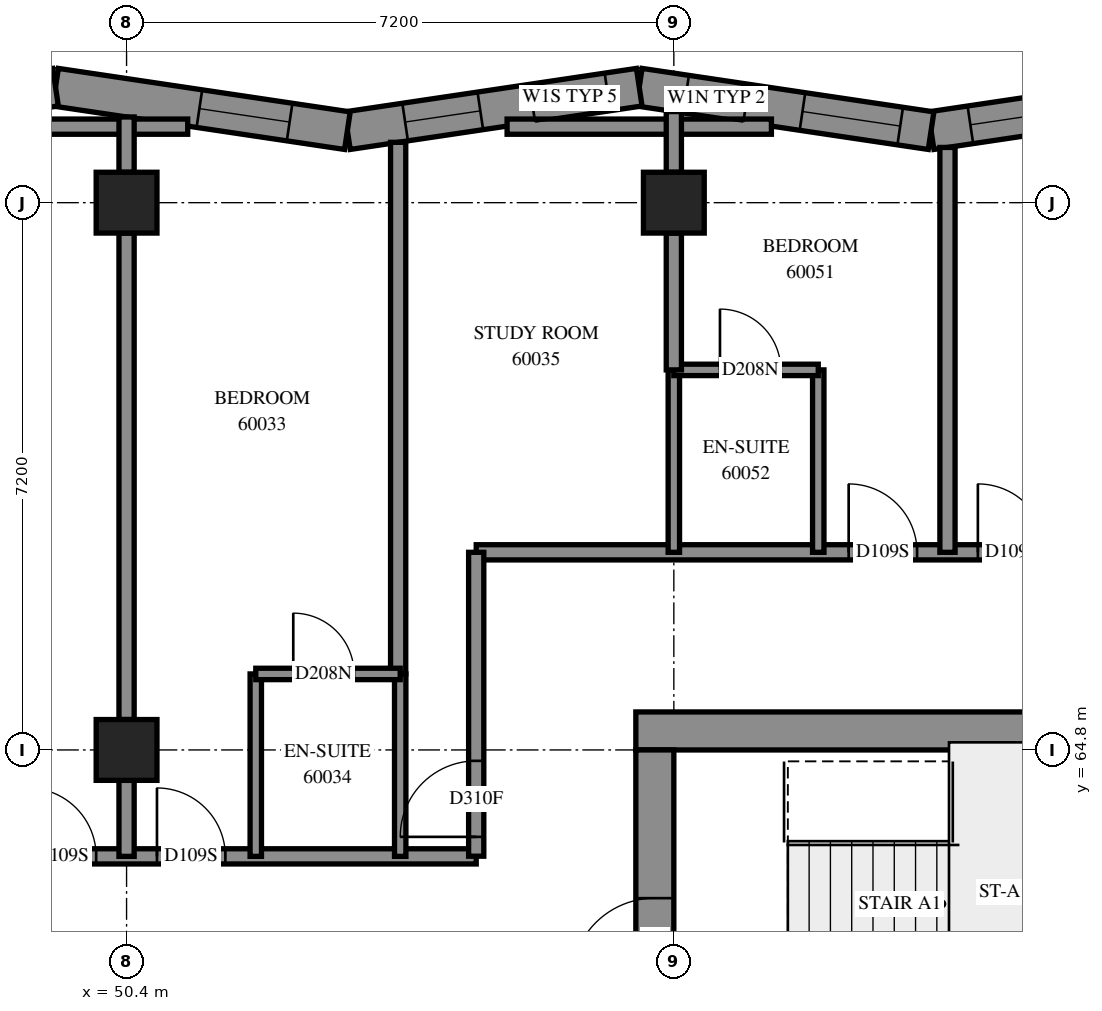
"""IFC4 building model, lengths in metres.
Left out: names, types, materials, properties, quantities, classifications, styles, units other than length and angle.
Written with IfcOpenShell. Run it as: python <this file> out.ifc"""

import sys

from ifc_helpers import new_model, si_unit, direction, frame, frame_2d, origin, origin_2d, place, context, subcontext, project, spatial, polyline, rectangle, outline, extrude, element, fill, save


model = new_model("IFC4")
c1 = context("Model", 3, precision=1e-05, world=origin(), true_north=direction((0.0, 1.0)))
c2 = subcontext(c1, "Body", "Model", "MODEL_VIEW")
j1 = project(units=[si_unit("LENGTHUNIT", "METRE"), si_unit("PLANEANGLEUNIT", "RADIAN")], contexts=[c1])
p1 = place(None, origin())
s1 = spatial("IfcSite", under=j1, at=p1, CompositionType="ELEMENT")
p2 = place(p1, origin())
s2 = spatial("IfcBuilding", under=s1, at=p2, CompositionType="ELEMENT")
p3 = place(p2, frame((0.0, 0.0, 220.2)))
s3 = spatial("IfcBuildingStorey", under=s2, at=p3, CompositionType="ELEMENT", Elevation=220.2)
for number, where, z_axis, x_axis in (
    (1, (50.4, 64.8, 0.0), (0.0, 0.0, 1.0), (1.0, 0.0, 0.0)),
    (2, (50.4, 72.0, 0.0), (0.0, 0.0, 1.0), (1.0, 0.0, 0.0)),
    (3, (57.6, 72.0, 0.0), (0.0, 0.0, 1.0), (1.0, 0.0, 0.0)),
):
    element("IfcColumn", number, at=place(p3, frame(where, z_axis=z_axis, x_axis=x_axis)), inside=s3, PredefinedType="COLUMN", context=c2, shape_type="SweptSolid", body=[
        extrude(rectangle(XDim=0.8, YDim=0.8, at=origin_2d()), origin(), (0.0, 0.0, 1.0), 3.1),
    ])
p4 = place(p3, frame((57.1, 65.05, -0.3), z_axis=(0.0, 0.0, 1.0), x_axis=(1.0, 0.0, 0.0)))
e4 = element("IfcWall", 4, at=p4, inside=s3, PredefinedType="SHEAR", context=c2, shape_type="SweptSolid", body=[
    extrude(rectangle(XDim=15.4, YDim=0.5, at=frame_2d((7.7, 0.0))), origin(), (0.0, 0.0, 1.0), 2.7),
])
p5 = place(p4, frame((10.5, 0.0, 0.3)))
e5 = element("IfcOpeningElement", 5, at=p5, cuts=e4, PredefinedType="OPENING", context=c2, shape_type="SweptSolid", body=[
    extrude(rectangle(XDim=0.8, YDim=2.1, at=frame_2d((0.4, 1.05))), frame((0.0, 0.26, 0.0), z_axis=(0.0, -1.0, 0.0), x_axis=(1.0, 0.0, 0.0)), (0.0, 0.0, 1.0), 0.52),
])
p6 = place(p3, frame((57.35, 50.4, -0.3), z_axis=(0.0, 0.0, 1.0), x_axis=(0.0, 1.0, 0.0)))
e6 = element("IfcWall", 6, at=p6, inside=s3, PredefinedType="SHEAR", context=c2, shape_type="SweptSolid", body=[
    extrude(rectangle(XDim=14.4, YDim=0.5, at=frame_2d((7.2, 0.0))), origin(), (0.0, 0.0, 1.0), 2.7),
])
p7 = place(p6, frame((4.55, 0.0, 0.3)))
e7 = element("IfcOpeningElement", 7, at=p7, cuts=e6, PredefinedType="OPENING", context=c2, shape_type="SweptSolid", body=[
    extrude(rectangle(XDim=1.1, YDim=2.1, at=frame_2d((0.55, 1.05))), frame((0.0, 0.26, 0.0), z_axis=(0.0, -1.0, 0.0), x_axis=(1.0, 0.0, 0.0)), (0.0, 0.0, 1.0), 0.52),
])
p8 = place(p6, frame((11.35, 0.0, 0.3)))
e8 = element("IfcOpeningElement", 8, at=p8, cuts=e6, PredefinedType="OPENING", context=c2, shape_type="SweptSolid", body=[
    extrude(rectangle(XDim=1.1, YDim=2.1, at=frame_2d((0.55, 1.05))), frame((0.0, 0.26, 0.0), z_axis=(0.0, -1.0, 0.0), x_axis=(1.0, 0.0, 0.0)), (0.0, 0.0, 1.0), 0.52),
])
p9 = place(p3, frame((64.824, 73.519, 0.0), z_axis=(0.0, 0.0, 1.0), x_axis=(-0.9890847468, -0.1473477641, 0.0)))
e9 = element("IfcWall", 9, at=p9, inside=s3, PredefinedType="SOLIDWALL", context=c2, shape_type="SweptSolid", body=[
    extrude(outline(polyline([(-0.037, -0.25), (3.845, -0.25), (3.919, 0.25), (0.037, 0.25), (-0.037, -0.25)])), origin(), (0.0, 0.0, 1.0), 3.1),
])
p10 = place(p9, frame((0.36, 0.0, 0.45)))
e10 = element("IfcOpeningElement", 10, at=p10, cuts=e9, PredefinedType="OPENING", context=c2, shape_type="SweptSolid", body=[
    extrude(rectangle(XDim=1.3, YDim=2.5, at=frame_2d((0.65, 1.25))), frame((0.0, 0.26, 0.0), z_axis=(0.0, -1.0, 0.0), x_axis=(1.0, 0.0, 0.0)), (0.0, 0.0, 1.0), 0.52),
])
p11 = place(p9, frame((2.06, 0.0, 0.45)))
e11 = element("IfcOpeningElement", 11, at=p11, cuts=e9, PredefinedType="OPENING", context=c2, shape_type="SweptSolid", body=[
    extrude(rectangle(XDim=1.3, YDim=2.5, at=frame_2d((0.65, 1.25))), frame((0.0, 0.26, 0.0), z_axis=(0.0, -1.0, 0.0), x_axis=(1.0, 0.0, 0.0)), (0.0, 0.0, 1.0), 0.52),
])
p12 = place(p3, frame((60.984, 72.947, 0.0), z_axis=(0.0, 0.0, 1.0), x_axis=(-0.9890847468, 0.1473477641, 0.0)))
e12 = element("IfcWall", 12, at=p12, inside=s3, PredefinedType="SOLIDWALL", context=c2, shape_type="SweptSolid", body=[
    extrude(outline(polyline([(0.037, -0.25), (3.919, -0.25), (3.845, 0.25), (-0.037, 0.25), (0.037, -0.25)])), origin(), (0.0, 0.0, 1.0), 3.1),
])
p13 = place(p12, frame((0.411, 0.0, 0.45)))
e13 = element("IfcOpeningElement", 13, at=p13, cuts=e12, PredefinedType="OPENING", context=c2, shape_type="SweptSolid", body=[
    extrude(rectangle(XDim=1.3, YDim=2.5, at=frame_2d((0.65, 1.25))), frame((0.0, 0.26, 0.0), z_axis=(0.0, -1.0, 0.0), x_axis=(1.0, 0.0, 0.0)), (0.0, 0.0, 1.0), 0.52),
])
p14 = place(p12, frame((2.459, 0.0, 0.45)))
e14 = element("IfcOpeningElement", 14, at=p14, cuts=e12, PredefinedType="OPENING", context=c2, shape_type="SweptSolid", body=[
    extrude(rectangle(XDim=0.8, YDim=2.5, at=frame_2d((0.4, 1.25))), frame((0.0, 0.26, 0.0), z_axis=(0.0, -1.0, 0.0), x_axis=(1.0, 0.0, 0.0)), (0.0, 0.0, 1.0), 0.52),
])
p15 = place(p3, frame((57.145, 73.519, 0.0), z_axis=(0.0, 0.0, 1.0), x_axis=(-0.9890847468, -0.1473477641, 0.0)))
e15 = element("IfcWall", 15, at=p15, inside=s3, PredefinedType="SOLIDWALL", context=c2, shape_type="SweptSolid", body=[
    extrude(outline(polyline([(-0.037, -0.25), (3.845, -0.25), (3.919, 0.25), (0.037, 0.25), (-0.037, -0.25)])), origin(), (0.0, 0.0, 1.0), 3.1),
])
p16 = place(p15, frame((0.423, 0.0, 0.45)))
e16 = element("IfcOpeningElement", 16, at=p16, cuts=e15, PredefinedType="OPENING", context=c2, shape_type="SweptSolid", body=[
    extrude(rectangle(XDim=1.0, YDim=2.5, at=frame_2d((0.5, 1.25))), frame((0.0, 0.26, 0.0), z_axis=(0.0, -1.0, 0.0), x_axis=(1.0, 0.0, 0.0)), (0.0, 0.0, 1.0), 0.52),
])
p17 = place(p15, frame((2.114, 0.0, 0.45)))
e17 = element("IfcOpeningElement", 17, at=p17, cuts=e15, PredefinedType="OPENING", context=c2, shape_type="SweptSolid", body=[
    extrude(rectangle(XDim=1.0, YDim=2.5, at=frame_2d((0.5, 1.25))), frame((0.0, 0.26, 0.0), z_axis=(0.0, -1.0, 0.0), x_axis=(1.0, 0.0, 0.0)), (0.0, 0.0, 1.0), 0.52),
])
p18 = place(p3, frame((53.305, 72.947, 0.0), z_axis=(0.0, 0.0, 1.0), x_axis=(-0.9890847468, 0.1473477641, 0.0)))
e18 = element("IfcWall", 18, at=p18, inside=s3, PredefinedType="SOLIDWALL", context=c2, shape_type="SweptSolid", body=[
    extrude(outline(polyline([(0.037, -0.25), (3.919, -0.25), (3.845, 0.25), (-0.037, 0.25), (0.037, -0.25)])), origin(), (0.0, 0.0, 1.0), 3.1),
])
p19 = place(p18, frame((0.769, 0.0, 0.45)))
e19 = element("IfcOpeningElement", 19, at=p19, cuts=e18, PredefinedType="OPENING", context=c2, shape_type="SweptSolid", body=[
    extrude(rectangle(XDim=1.2, YDim=2.5, at=frame_2d((0.6, 1.25))), frame((0.0, 0.26, 0.0), z_axis=(0.0, -1.0, 0.0), x_axis=(1.0, 0.0, 0.0)), (0.0, 0.0, 1.0), 0.52),
])
p20 = place(p3, frame((49.466, 73.519, 0.0), z_axis=(0.0, 0.0, 1.0), x_axis=(-0.9890847468, -0.1473477641, 0.0)))
e20 = element("IfcWall", 20, at=p20, inside=s3, PredefinedType="SOLIDWALL", context=c2, shape_type="SweptSolid", body=[
    extrude(outline(polyline([(-0.037, -0.25), (3.845, -0.25), (3.919, 0.25), (0.037, 0.25), (-0.037, -0.25)])), origin(), (0.0, 0.0, 1.0), 3.1),
])
p21 = place(p20, frame((0.466, 0.0, 0.45)))
e21 = element("IfcOpeningElement", 21, at=p21, cuts=e20, PredefinedType="OPENING", context=c2, shape_type="SweptSolid", body=[
    extrude(rectangle(XDim=1.2, YDim=2.5, at=frame_2d((0.6, 1.25))), frame((0.0, 0.26, 0.0), z_axis=(0.0, -1.0, 0.0), x_axis=(1.0, 0.0, 0.0)), (0.0, 0.0, 1.0), 0.52),
])
p22 = place(p3, frame((55.0, 67.4, 0.0), z_axis=(0.0, 0.0, 1.0), x_axis=(1.0, 0.0, 0.0)))
e22 = element("IfcWall", 22, at=p22, inside=s3, PredefinedType="PARTITIONING", context=c2, shape_type="SweptSolid", body=[
    extrude(rectangle(XDim=19.6, YDim=0.2, at=frame_2d((9.8, 0.0))), origin(), (0.0, 0.0, 1.0), 3.1),
])
p23 = place(p22, frame((4.9, 0.0, 0.0)))
e23 = element("IfcOpeningElement", 23, at=p23, cuts=e22, PredefinedType="OPENING", context=c2, shape_type="SweptSolid", body=[
    extrude(rectangle(XDim=0.9, YDim=2.1, at=frame_2d((0.45, 1.05))), frame((0.0, 0.11, 0.0), z_axis=(0.0, -1.0, 0.0), x_axis=(1.0, 0.0, 0.0)), (0.0, 0.0, 1.0), 0.22),
])
p24 = place(p22, frame((6.6, 0.0, 0.0)))
e24 = element("IfcOpeningElement", 24, at=p24, cuts=e22, PredefinedType="OPENING", context=c2, shape_type="SweptSolid", body=[
    extrude(rectangle(XDim=0.9, YDim=2.1, at=frame_2d((0.45, 1.05))), frame((0.0, 0.11, 0.0), z_axis=(0.0, -1.0, 0.0), x_axis=(1.0, 0.0, 0.0)), (0.0, 0.0, 1.0), 0.22),
])
p25 = place(p22, frame((14.001, 0.0, 0.0)))
e25 = element("IfcOpeningElement", 25, at=p25, cuts=e22, PredefinedType="OPENING", context=c2, shape_type="SweptSolid", body=[
    extrude(rectangle(XDim=0.9, YDim=2.1, at=frame_2d((0.45, 1.05))), frame((0.0, 0.11, 0.0), z_axis=(0.0, -1.0, 0.0), x_axis=(1.0, 0.0, 0.0)), (0.0, 0.0, 1.0), 0.22),
])
p26 = place(p3, frame((40.602, 63.4, 0.0), z_axis=(0.0, 0.0, 1.0), x_axis=(1.0, 0.0, 0.0)))
e26 = element("IfcWall", 26, at=p26, inside=s3, PredefinedType="PARTITIONING", context=c2, shape_type="SweptSolid", body=[
    extrude(rectangle(XDim=14.398, YDim=0.2, at=frame_2d((7.199, 0.0))), origin(), (0.0, 0.0, 1.0), 3.1),
])
p27 = place(p26, frame((2.998, 0.0, 0.0)))
e27 = element("IfcOpeningElement", 27, at=p27, cuts=e26, PredefinedType="OPENING", context=c2, shape_type="SweptSolid", body=[
    extrude(rectangle(XDim=0.9, YDim=2.1, at=frame_2d((0.45, 1.05))), frame((0.0, 0.11, 0.0), z_axis=(0.0, -1.0, 0.0), x_axis=(1.0, 0.0, 0.0)), (0.0, 0.0, 1.0), 0.22),
])
p28 = place(p26, frame((8.498, 0.0, 0.0)))
e28 = element("IfcOpeningElement", 28, at=p28, cuts=e26, PredefinedType="OPENING", context=c2, shape_type="SweptSolid", body=[
    extrude(rectangle(XDim=0.9, YDim=2.1, at=frame_2d((0.45, 1.05))), frame((0.0, 0.11, 0.0), z_axis=(0.0, -1.0, 0.0), x_axis=(1.0, 0.0, 0.0)), (0.0, 0.0, 1.0), 0.22),
])
p29 = place(p26, frame((10.198, 0.0, 0.0)))
e29 = element("IfcOpeningElement", 29, at=p29, cuts=e26, PredefinedType="OPENING", context=c2, shape_type="SweptSolid", body=[
    extrude(rectangle(XDim=0.9, YDim=2.1, at=frame_2d((0.45, 1.05))), frame((0.0, 0.11, 0.0), z_axis=(0.0, -1.0, 0.0), x_axis=(1.0, 0.0, 0.0)), (0.0, 0.0, 1.0), 0.22),
])
p30 = place(p3, frame((53.973, 65.8, 0.0), z_axis=(0.0, 0.0, 1.0), x_axis=(0.0, 1.0, 0.0)))
e30 = element("IfcWall", 30, at=p30, inside=s3, PredefinedType="PARTITIONING", context=c2, shape_type="SweptSolid", body=[
    extrude(rectangle(XDim=6.994, YDim=0.2, at=frame_2d((3.497, 0.0))), origin(), (0.0, 0.0, 1.0), 3.1),
])
p31 = place(p3, frame((50.4, 65.2, 0.0), z_axis=(0.0, 0.0, 1.0), x_axis=(0.0, 1.0, 0.0)))
e31 = element("IfcWall", 31, at=p31, inside=s3, PredefinedType="PARTITIONING", context=c2, shape_type="SweptSolid", body=[
    extrude(rectangle(XDim=6.4, YDim=0.2, at=frame_2d((3.2, 0.0))), origin(), (0.0, 0.0, 1.0), 3.1),
])
p32 = place(p3, frame((61.2, 67.4, 0.0), z_axis=(0.0, 0.0, 1.0), x_axis=(0.0, 1.0, 0.0)))
e32 = element("IfcWall", 32, at=p32, inside=s3, PredefinedType="PARTITIONING", context=c2, shape_type="SweptSolid", body=[
    extrude(rectangle(XDim=5.327, YDim=0.2, at=frame_2d((2.663, 0.0))), origin(), (0.0, 0.0, 1.0), 3.1),
])
p33 = place(p3, frame((55.0, 63.402, 0.0), z_axis=(0.0, 0.0, 1.0), x_axis=(0.0, 1.0, 0.0)))
e33 = element("IfcWall", 33, at=p33, inside=s3, PredefinedType="PARTITIONING", context=c2, shape_type="SweptSolid", body=[
    extrude(rectangle(XDim=3.998, YDim=0.2, at=frame_2d((1.999, 0.0))), origin(), (0.0, 0.0, 1.0), 3.1),
])
p34 = place(p33, frame((0.255, 0.0, 0.0)))
e34 = element("IfcOpeningElement", 34, at=p34, cuts=e33, PredefinedType="OPENING", context=c2, shape_type="SweptSolid", body=[
    extrude(rectangle(XDim=1.0, YDim=2.1, at=frame_2d((0.5, 1.05))), frame((0.0, 0.11, 0.0), z_axis=(0.0, -1.0, 0.0), x_axis=(1.0, 0.0, 0.0)), (0.0, 0.0, 1.0), 0.22),
])
for number, where, z_axis, x_axis in (
    (35, (47.727, 73.0, 0.0), (0.0, 0.0, 1.0), (1.0, 0.0, 0.0)),
    (36, (55.406, 73.0, 0.0), (0.0, 0.0, 1.0), (1.0, 0.0, 0.0)),
):
    element("IfcWall", number, at=place(p3, frame(where, z_axis=z_axis, x_axis=x_axis)), inside=s3, PredefinedType="PARTITIONING", context=c2, shape_type="SweptSolid", body=[
        extrude(rectangle(XDim=3.478, YDim=0.2, at=frame_2d((1.739, 0.0))), origin(), (0.0, 0.0, 1.0), 3.1),
    ])
for number, where, z_axis, x_axis in (
    (37, (52.1, 63.4, 0.0), (0.0, 0.0, 1.0), (0.0, 1.0, 0.0)),
    (38, (54.0, 63.4, 0.0), (0.0, 0.0, 1.0), (0.0, 1.0, 0.0)),
    (39, (59.5, 67.4, 0.0), (0.0, 0.0, 1.0), (0.0, 1.0, 0.0)),
    (40, (57.6, 67.4, 0.0), (0.0, 0.0, 1.0), (0.0, 1.0, 0.0)),
):
    element("IfcWall", number, at=place(p3, frame(where, z_axis=z_axis, x_axis=x_axis)), inside=s3, PredefinedType="PARTITIONING", context=c2, shape_type="SweptSolid", body=[
        extrude(rectangle(XDim=2.4, YDim=0.15, at=frame_2d((1.2, 0.0))), origin(), (0.0, 0.0, 1.0), 3.1),
    ])
p35 = place(p3, frame((52.1, 65.8, 0.0), z_axis=(0.0, 0.0, 1.0), x_axis=(1.0, 0.0, 0.0)))
e41 = element("IfcWall", 41, at=p35, inside=s3, PredefinedType="PARTITIONING", context=c2, shape_type="SweptSolid", body=[
    extrude(rectangle(XDim=1.9, YDim=0.15, at=frame_2d((0.95, 0.0))), origin(), (0.0, 0.0, 1.0), 3.1),
])
p36 = place(p35, frame((0.493, 0.0, 0.0)))
e42 = element("IfcOpeningElement", 42, at=p36, cuts=e41, PredefinedType="OPENING", context=c2, shape_type="SweptSolid", body=[
    extrude(rectangle(XDim=0.8, YDim=2.1, at=frame_2d((0.4, 1.05))), frame((0.0, 0.085, 0.0), z_axis=(0.0, -1.0, 0.0), x_axis=(1.0, 0.0, 0.0)), (0.0, 0.0, 1.0), 0.17),
])
p37 = place(p3, frame((57.6, 69.8, 0.0), z_axis=(0.0, 0.0, 1.0), x_axis=(1.0, 0.0, 0.0)))
e43 = element("IfcWall", 43, at=p37, inside=s3, PredefinedType="PARTITIONING", context=c2, shape_type="SweptSolid", body=[
    extrude(rectangle(XDim=1.9, YDim=0.15, at=frame_2d((0.95, 0.0))), origin(), (0.0, 0.0, 1.0), 3.1),
])
p38 = place(p37, frame((0.607, 0.0, 0.0)))
e44 = element("IfcOpeningElement", 44, at=p38, cuts=e43, PredefinedType="OPENING", context=c2, shape_type="SweptSolid", body=[
    extrude(rectangle(XDim=0.8, YDim=2.1, at=frame_2d((0.4, 1.05))), frame((0.0, 0.085, 0.0), z_axis=(0.0, -1.0, 0.0), x_axis=(1.0, 0.0, 0.0)), (0.0, 0.0, 1.0), 0.17),
])
p39 = place(p3, frame((57.6, 69.8, 0.0), z_axis=(0.0, 0.0, 1.0), x_axis=(0.0, 1.0, 0.0)))
e45 = element("IfcWall", 45, at=p39, inside=s3, PredefinedType="PARTITIONING", context=c2, shape_type="SweptSolid", body=[
    extrude(rectangle(XDim=1.8, YDim=0.2, at=frame_2d((0.9, 0.0))), origin(), (0.0, 0.0, 1.0), 3.1),
])
p40 = place(p3, frame((50.4, 63.4, 0.0), z_axis=(0.0, 0.0, 1.0), x_axis=(0.0, 1.0, 0.0)))
e46 = element("IfcWall", 46, at=p40, inside=s3, PredefinedType="PARTITIONING", context=c2, shape_type="SweptSolid", body=[
    extrude(rectangle(XDim=1.0, YDim=0.2, at=frame_2d((0.5, 0.0))), origin(), (0.0, 0.0, 1.0), 3.1),
])
p41 = place(p3, frame((50.4, 72.4, 0.0), z_axis=(0.0, 0.0, 1.0), x_axis=(0.0, 1.0, 0.0)))
e47 = element("IfcWall", 47, at=p41, inside=s3, PredefinedType="PARTITIONING", context=c2, shape_type="SweptSolid", body=[
    extrude(rectangle(XDim=0.727, YDim=0.2, at=frame_2d((0.364, 0.0))), origin(), (0.0, 0.0, 1.0), 3.1),
])
p42 = place(p3, frame((57.6, 72.4, 0.0), z_axis=(0.0, 0.0, 1.0), x_axis=(0.0, 1.0, 0.0)))
e48 = element("IfcWall", 48, at=p42, inside=s3, PredefinedType="PARTITIONING", context=c2, shape_type="SweptSolid", body=[
    extrude(rectangle(XDim=0.799, YDim=0.2, at=frame_2d((0.399, 0.0))), origin(), (0.0, 0.0, 1.0), 3.1),
])
p43 = place(p11, origin())
e49 = element("IfcWindow", 49, at=p43, inside=s3, PartitioningType="SINGLE_PANEL", PredefinedType="WINDOW", context=c2, shape_type="SweptSolid", body=[
    extrude(rectangle(XDim=1.3, YDim=2.5, at=frame_2d((0.65, 1.25))), frame((0.0, 0.18, 0.0), z_axis=(0.0, -1.0, 0.0), x_axis=(1.0, 0.0, 0.0)), (0.0, 0.0, 1.0), 0.06),
])
fill(e11, e49)
p44 = place(p13, origin())
e50 = element("IfcWindow", 50, at=p44, inside=s3, PartitioningType="SINGLE_PANEL", PredefinedType="WINDOW", context=c2, shape_type="SweptSolid", body=[
    extrude(rectangle(XDim=1.3, YDim=2.5, at=frame_2d((0.65, 1.25))), frame((0.0, 0.18, 0.0), z_axis=(0.0, -1.0, 0.0), x_axis=(1.0, 0.0, 0.0)), (0.0, 0.0, 1.0), 0.06),
])
fill(e13, e50)
p45 = place(p19, origin())
e51 = element("IfcWindow", 51, at=p45, inside=s3, PartitioningType="SINGLE_PANEL", PredefinedType="WINDOW", context=c2, shape_type="SweptSolid", body=[
    extrude(rectangle(XDim=1.2, YDim=2.5, at=frame_2d((0.6, 1.25))), frame((0.0, 0.18, 0.0), z_axis=(0.0, -1.0, 0.0), x_axis=(1.0, 0.0, 0.0)), (0.0, 0.0, 1.0), 0.06),
])
fill(e19, e51)
p46 = place(p8, origin())
e52 = element("IfcDoor", 52, at=p46, inside=s3, OperationType="SINGLE_SWING_LEFT", PredefinedType="DOOR", context=c2, shape_type="SweptSolid", body=[
    extrude(rectangle(XDim=1.1, YDim=2.1, at=frame_2d((0.55, 1.05))), frame((0.0, 0.025, 0.0), z_axis=(0.0, -1.0, 0.0), x_axis=(1.0, 0.0, 0.0)), (0.0, 0.0, 1.0), 0.05),
])
fill(e8, e52)
p47 = place(p28, origin())
e53 = element("IfcDoor", 53, at=p47, inside=s3, OperationType="SINGLE_SWING_LEFT", PredefinedType="DOOR", context=c2, shape_type="SweptSolid", body=[
    extrude(rectangle(XDim=0.9, YDim=2.1, at=frame_2d((0.45, 1.05))), frame((0.0, 0.025, 0.0), z_axis=(0.0, -1.0, 0.0), x_axis=(1.0, 0.0, 0.0)), (0.0, 0.0, 1.0), 0.05),
])
fill(e28, e53)
p48 = place(p29, origin())
e54 = element("IfcDoor", 54, at=p48, inside=s3, OperationType="SINGLE_SWING_RIGHT", PredefinedType="DOOR", context=c2, shape_type="SweptSolid", body=[
    extrude(rectangle(XDim=0.9, YDim=2.1, at=frame_2d((0.45, 1.05))), frame((0.0, 0.025, 0.0), z_axis=(0.0, -1.0, 0.0), x_axis=(1.0, 0.0, 0.0)), (0.0, 0.0, 1.0), 0.05),
])
fill(e29, e54)
p49 = place(p36, origin())
e55 = element("IfcDoor", 55, at=p49, inside=s3, OperationType="SINGLE_SWING_RIGHT", PredefinedType="DOOR", context=c2, shape_type="SweptSolid", body=[
    extrude(rectangle(XDim=0.8, YDim=2.1, at=frame_2d((0.4, 1.05))), frame((0.0, 0.025, 0.0), z_axis=(0.0, -1.0, 0.0), x_axis=(1.0, 0.0, 0.0)), (0.0, 0.0, 1.0), 0.05),
])
fill(e42, e55)
p50 = place(p34, origin())
e56 = element("IfcDoor", 56, at=p50, inside=s3, OperationType="SINGLE_SWING_LEFT", PredefinedType="DOOR", context=c2, shape_type="SweptSolid", body=[
    extrude(rectangle(XDim=1.0, YDim=2.1, at=frame_2d((0.5, 1.05))), frame((0.0, 0.025, 0.0), z_axis=(0.0, -1.0, 0.0), x_axis=(1.0, 0.0, 0.0)), (0.0, 0.0, 1.0), 0.05),
])
fill(e34, e56)
p51 = place(p23, origin())
e57 = element("IfcDoor", 57, at=p51, inside=s3, OperationType="SINGLE_SWING_RIGHT", PredefinedType="DOOR", context=c2, shape_type="SweptSolid", body=[
    extrude(rectangle(XDim=0.9, YDim=2.1, at=frame_2d((0.45, 1.05))), frame((0.0, 0.025, 0.0), z_axis=(0.0, -1.0, 0.0), x_axis=(1.0, 0.0, 0.0)), (0.0, 0.0, 1.0), 0.05),
])
fill(e23, e57)
p52 = place(p38, origin())
e58 = element("IfcDoor", 58, at=p52, inside=s3, OperationType="SINGLE_SWING_RIGHT", PredefinedType="DOOR", context=c2, shape_type="SweptSolid", body=[
    extrude(rectangle(XDim=0.8, YDim=2.1, at=frame_2d((0.4, 1.05))), frame((0.0, 0.025, 0.0), z_axis=(0.0, -1.0, 0.0), x_axis=(1.0, 0.0, 0.0)), (0.0, 0.0, 1.0), 0.05),
])
fill(e44, e58)
p53 = place(p24, origin())
e59 = element("IfcDoor", 59, at=p53, inside=s3, OperationType="SINGLE_SWING_LEFT", PredefinedType="DOOR", context=c2, shape_type="SweptSolid", body=[
    extrude(rectangle(XDim=0.9, YDim=2.1, at=frame_2d((0.45, 1.05))), frame((0.0, 0.025, 0.0), z_axis=(0.0, -1.0, 0.0), x_axis=(1.0, 0.0, 0.0)), (0.0, 0.0, 1.0), 0.05),
])
fill(e24, e59)
p54 = place(p14, origin())
e60 = element("IfcWindow", 60, at=p54, inside=s3, PartitioningType="SINGLE_PANEL", PredefinedType="WINDOW", context=c2, shape_type="SweptSolid", body=[
    extrude(rectangle(XDim=0.8, YDim=2.5, at=frame_2d((0.4, 1.25))), frame((0.0, 0.18, 0.0), z_axis=(0.0, -1.0, 0.0), x_axis=(1.0, 0.0, 0.0)), (0.0, 0.0, 1.0), 0.06),
])
fill(e14, e60)
p55 = place(p16, origin())
e61 = element("IfcWindow", 61, at=p55, inside=s3, PartitioningType="SINGLE_PANEL", PredefinedType="WINDOW", context=c2, shape_type="SweptSolid", body=[
    extrude(rectangle(XDim=1.0, YDim=2.5, at=frame_2d((0.5, 1.25))), frame((0.0, 0.18, 0.0), z_axis=(0.0, -1.0, 0.0), x_axis=(1.0, 0.0, 0.0)), (0.0, 0.0, 1.0), 0.06),
])
fill(e16, e61)
p56 = place(p17, origin())
e62 = element("IfcWindow", 62, at=p56, inside=s3, PartitioningType="SINGLE_PANEL", PredefinedType="WINDOW", context=c2, shape_type="SweptSolid", body=[
    extrude(rectangle(XDim=1.0, YDim=2.5, at=frame_2d((0.5, 1.25))), frame((0.0, 0.18, 0.0), z_axis=(0.0, -1.0, 0.0), x_axis=(1.0, 0.0, 0.0)), (0.0, 0.0, 1.0), 0.06),
])
fill(e17, e62)
save(model, sys.argv[1])
